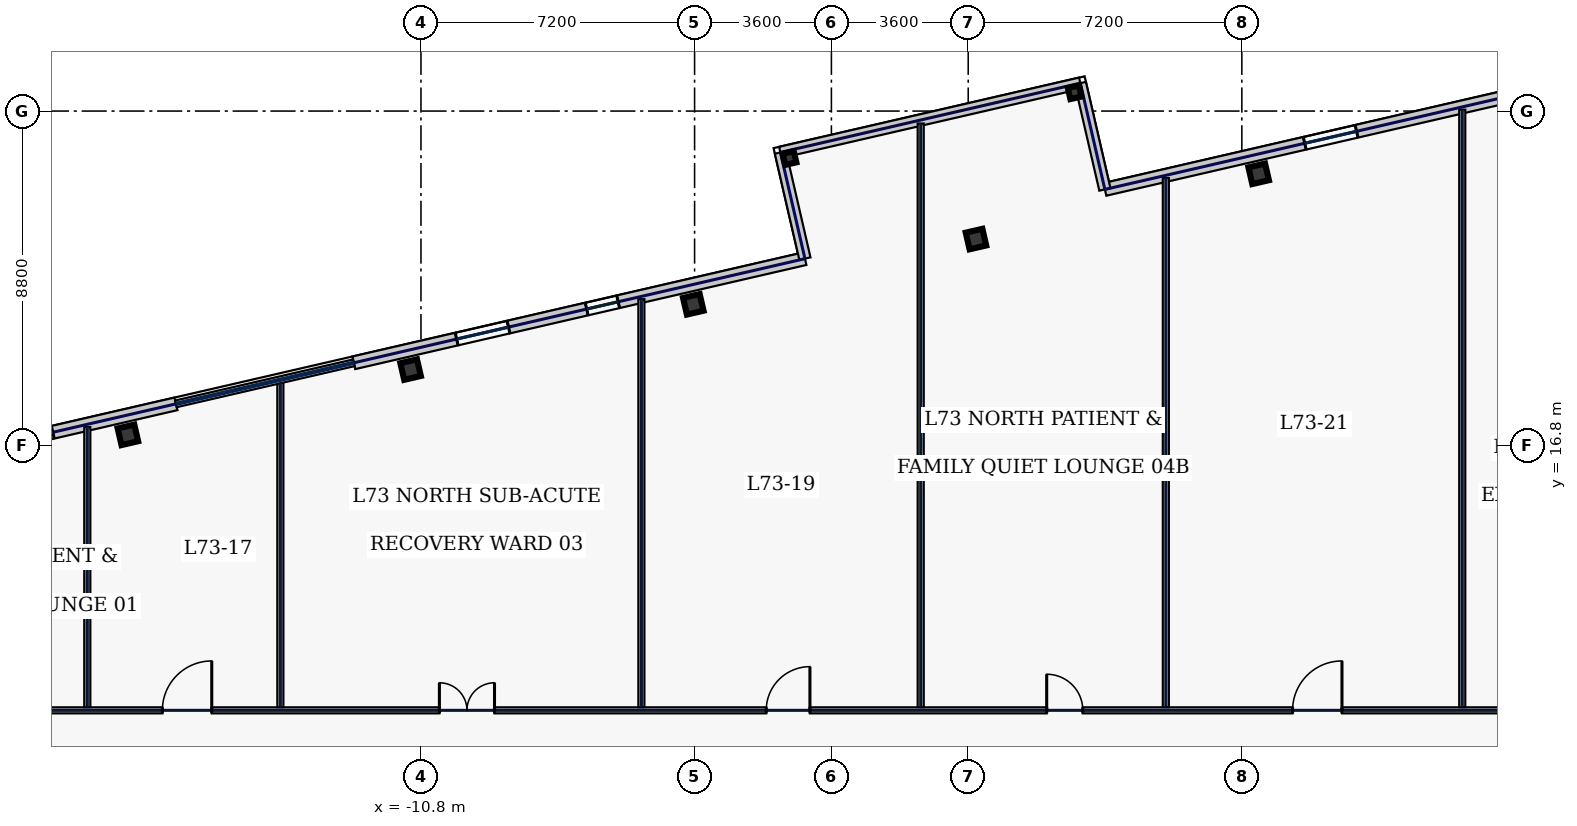
"""IFC4 building model, lengths in metres.
Left out: names, types, materials, properties, quantities, classifications, styles, units other than length and angle.
Written with IfcOpenShell. Run it as: python <this file> out.ifc"""

import sys

from ifc_helpers import new_model, si_unit, direction, frame, frame_2d, origin, origin_2d, place, context, subcontext, project, spatial, rectangle, hollow_rectangle, extrude, element, fill, save


model = new_model("IFC4")
c1 = context("Model", 3, precision=1e-05, world=origin(), true_north=direction((0.0, 1.0)))
c2 = subcontext(c1, "Body", "Model", "MODEL_VIEW")
j1 = project(units=[si_unit("LENGTHUNIT", "METRE"), si_unit("PLANEANGLEUNIT", "RADIAN")], contexts=[c1])
p1 = place(None, origin())
s1 = spatial("IfcSite", under=j1, at=p1, CompositionType="ELEMENT")
p2 = place(p1, origin())
s2 = spatial("IfcBuilding", under=s1, at=p2, CompositionType="ELEMENT")
p3 = place(p2, frame((0.0, 0.0, 313.0)))
s3 = spatial("IfcBuildingStorey", under=s2, at=p3, CompositionType="ELEMENT", Elevation=313.0)
for number, where, z_axis, x_axis in (
    (1, (11.243, 23.949, 0.0), (0.0, 0.0, 1.0), (0.974, 0.225, 0.0)),
    (2, (3.804, 22.232, 0.0), (0.0, 0.0, 1.0), (0.974, 0.225, 0.0)),
    (3, (-3.634, 20.514, 0.0), (0.0, 0.0, 1.0), (0.974, 0.225, 0.0)),
    (4, (-11.073, 18.797, 0.0), (0.0, 0.0, 1.0), (0.974, 0.225, 0.0)),
    (5, (-18.511, 17.08, 0.0), (0.0, 0.0, 1.0), (0.974, 0.225, 0.0)),
):
    element("IfcColumn", number, at=place(p3, frame(where, z_axis=z_axis, x_axis=x_axis)), inside=s3, PredefinedType="COLUMN", context=c2, shape_type="SweptSolid", body=[
        extrude(hollow_rectangle(XDim=0.45, YDim=0.45, WallThickness=0.022, at=origin_2d()), origin(), (0.0, 0.0, 1.0), 3.74),
    ])
for number, where, z_axis, x_axis in (
    (6, (-1.102, 24.363, 0.0), (0.0, 0.0, 1.0), (0.974, 0.225, 0.0)),
    (7, (6.401, 26.095, 0.0), (0.0, 0.0, 1.0), (0.974, 0.225, 0.0)),
):
    element("IfcColumn", number, at=place(p3, frame(where, z_axis=z_axis, x_axis=x_axis)), inside=s3, PredefinedType="COLUMN", context=c2, shape_type="SweptSolid", body=[
        extrude(hollow_rectangle(XDim=0.3, YDim=0.3, WallThickness=0.016, at=origin_2d()), origin(), (0.0, 0.0, 1.0), 3.74),
    ])
p4 = place(p3, frame((19.229, 26.316, 0.0), z_axis=(0.0, 0.0, 1.0), x_axis=(-0.974371201193, -0.224946131964, 0.0)))
e8 = element("IfcWall", 8, at=p4, inside=s3, PredefinedType="STANDARD", context=c2, shape_type="SweptSolid", body=[
    extrude(rectangle(XDim=12.35, YDim=0.34, at=frame_2d((6.175, 0.0))), origin(), (0.0, 0.0, 1.0), 3.74),
])
p5 = place(p4, frame((5.553, 0.0, 1.0)))
e9 = element("IfcOpeningElement", 9, at=p5, cuts=e8, PredefinedType="OPENING", context=c2, shape_type="SweptSolid", body=[
    extrude(rectangle(XDim=1.4, YDim=1.85, at=frame_2d((0.7, 0.925))), frame((0.0, 0.18, 0.0), z_axis=(0.0, -1.0, 0.0), x_axis=(1.0, 0.0, 0.0)), (0.0, 0.0, 1.0), 0.36),
])
p6 = place(p3, frame((-0.696, 21.716, 0.0), z_axis=(0.0, 0.0, 1.0), x_axis=(-0.974367550465, -0.224961944785, 0.0)))
e10 = element("IfcWall", 10, at=p6, inside=s3, PredefinedType="STANDARD", context=c2, shape_type="SweptSolid", body=[
    extrude(rectangle(XDim=12.184, YDim=0.34, at=frame_2d((6.092, 0.0))), origin(), (0.0, 0.0, 1.0), 3.74),
])
p7 = place(p6, frame((8.006, 0.0, 1.0)))
e11 = element("IfcOpeningElement", 11, at=p7, cuts=e10, PredefinedType="OPENING", context=c2, shape_type="SweptSolid", body=[
    extrude(rectangle(XDim=1.4, YDim=1.85, at=frame_2d((0.7, 0.925))), frame((0.0, 0.18, 0.0), z_axis=(0.0, -1.0, 0.0), x_axis=(1.0, 0.0, 0.0)), (0.0, 0.0, 1.0), 0.36),
])
p8 = place(p6, frame((5.044, 0.0, 1.0)))
e12 = element("IfcOpeningElement", 12, at=p8, cuts=e10, PredefinedType="OPENING", context=c2, shape_type="SweptSolid", body=[
    extrude(rectangle(XDim=0.85, YDim=1.85, at=frame_2d((0.425, 0.925))), frame((0.0, 0.18, 0.0), z_axis=(0.0, -1.0, 0.0), x_axis=(1.0, 0.0, 0.0)), (0.0, 0.0, 1.0), 0.36),
])
p9 = place(p3, frame((-17.245, 17.895, 0.0), z_axis=(0.0, 0.0, 1.0), x_axis=(-0.97437318493, -0.224937539085, 0.0)))
e13 = element("IfcWall", 13, at=p9, inside=s3, PredefinedType="STANDARD", context=c2, shape_type="SweptSolid", body=[
    extrude(rectangle(XDim=17.366, YDim=0.34, at=frame_2d((8.683, 0.0))), origin(), (0.0, 0.0, 1.0), 3.74),
])
p10 = place(p9, frame((13.925, 0.0, 1.0)))
e14 = element("IfcOpeningElement", 14, at=p10, cuts=e13, PredefinedType="OPENING", context=c2, shape_type="SweptSolid", body=[
    extrude(rectangle(XDim=1.4, YDim=1.85, at=frame_2d((0.7, 0.925))), frame((0.0, 0.18, 0.0), z_axis=(0.0, -1.0, 0.0), x_axis=(1.0, 0.0, 0.0)), (0.0, 0.0, 1.0), 0.36),
])
p11 = place(p9, frame((10.413, 0.0, 1.0)))
e15 = element("IfcOpeningElement", 15, at=p11, cuts=e13, PredefinedType="OPENING", context=c2, shape_type="SweptSolid", body=[
    extrude(rectangle(XDim=1.4, YDim=1.85, at=frame_2d((0.7, 0.925))), frame((0.0, 0.18, 0.0), z_axis=(0.0, -1.0, 0.0), x_axis=(1.0, 0.0, 0.0)), (0.0, 0.0, 1.0), 0.36),
])
p12 = place(p9, frame((3.329, 0.0, 1.0)))
e16 = element("IfcOpeningElement", 16, at=p12, cuts=e13, PredefinedType="OPENING", context=c2, shape_type="SweptSolid", body=[
    extrude(rectangle(XDim=0.85, YDim=1.85, at=frame_2d((0.425, 0.925))), frame((0.0, 0.18, 0.0), z_axis=(0.0, -1.0, 0.0), x_axis=(1.0, 0.0, 0.0)), (0.0, 0.0, 1.0), 0.36),
])
for number, where, z_axis, x_axis in (
    (17, (-0.696, 21.716, 0.0), (0.0, 0.0, 1.0), (-0.225, 0.974, 0.0)),
    (18, (7.196, 23.538, 0.0), (0.0, 0.0, 1.0), (-0.225, 0.974, 0.0)),
):
    element("IfcWall", number, at=place(p3, frame(where, z_axis=z_axis, x_axis=x_axis)), inside=s3, PredefinedType="STANDARD", context=c2, shape_type="SweptSolid", body=[
        extrude(rectangle(XDim=2.87, YDim=0.3, at=frame_2d((1.435, 0.0))), origin(), (0.0, 0.0, 1.0), 3.74),
    ])
p13 = place(p3, frame((-1.342, 24.512, 0.0), z_axis=(0.0, 0.0, 1.0), x_axis=(0.974371888243, 0.224943155936, 0.0)))
e19 = element("IfcWall", 19, at=p13, inside=s3, PredefinedType="STANDARD", context=c2, shape_type="SweptSolid", body=[
    extrude(rectangle(XDim=8.1, YDim=0.3, at=frame_2d((4.05, 0.0))), origin(), (0.0, 0.0, 1.0), 2.135),
])
p14 = place(p3, frame((-24.145, 9.83, 0.0), z_axis=(0.0, 0.0, 1.0), x_axis=(1.0, 0.0, 0.0)))
e20 = element("IfcWall", 20, at=p14, inside=s3, PredefinedType="PARTITIONING", context=c2, shape_type="SweptSolid", body=[
    extrude(rectangle(XDim=48.29, YDim=0.16, at=frame_2d((24.145, 0.0))), origin(), (0.0, 0.0, 1.0), 3.74),
])
p15 = place(p14, frame((2.044, 0.0, 0.0)))
e21 = element("IfcOpeningElement", 21, at=p15, cuts=e20, PredefinedType="OPENING", context=c2, shape_type="SweptSolid", body=[
    extrude(rectangle(XDim=0.95, YDim=2.2, at=frame_2d((0.475, 1.1))), frame((0.0, 0.09, 0.0), z_axis=(0.0, -1.0, 0.0), x_axis=(1.0, 0.0, 0.0)), (0.0, 0.0, 1.0), 0.18),
])
p16 = place(p14, frame((6.54, 0.0, 0.0)))
e22 = element("IfcOpeningElement", 22, at=p16, cuts=e20, PredefinedType="OPENING", context=c2, shape_type="SweptSolid", body=[
    extrude(rectangle(XDim=1.3, YDim=2.2, at=frame_2d((0.65, 1.1))), frame((0.0, 0.09, 0.0), z_axis=(0.0, -1.0, 0.0), x_axis=(1.0, 0.0, 0.0)), (0.0, 0.0, 1.0), 0.18),
])
p17 = place(p14, frame((13.83, 0.0, 0.0)))
e23 = element("IfcOpeningElement", 23, at=p17, cuts=e20, PredefinedType="OPENING", context=c2, shape_type="SweptSolid", body=[
    extrude(rectangle(XDim=1.45, YDim=2.2, at=frame_2d((0.725, 1.1))), frame((0.0, 0.09, 0.0), z_axis=(0.0, -1.0, 0.0), x_axis=(1.0, 0.0, 0.0)), (0.0, 0.0, 1.0), 0.18),
])
p18 = place(p14, frame((22.43, 0.0, 0.0)))
e24 = element("IfcOpeningElement", 24, at=p18, cuts=e20, PredefinedType="OPENING", context=c2, shape_type="SweptSolid", body=[
    extrude(rectangle(XDim=1.15, YDim=2.2, at=frame_2d((0.575, 1.1))), frame((0.0, 0.09, 0.0), z_axis=(0.0, -1.0, 0.0), x_axis=(1.0, 0.0, 0.0)), (0.0, 0.0, 1.0), 0.18),
])
p19 = place(p14, frame((29.81, 0.0, 0.0)))
e25 = element("IfcOpeningElement", 25, at=p19, cuts=e20, PredefinedType="OPENING", context=c2, shape_type="SweptSolid", body=[
    extrude(rectangle(XDim=0.95, YDim=2.2, at=frame_2d((0.475, 1.1))), frame((0.0, 0.09, 0.0), z_axis=(0.0, -1.0, 0.0), x_axis=(1.0, 0.0, 0.0)), (0.0, 0.0, 1.0), 0.18),
])
p20 = place(p14, frame((36.28, 0.0, 0.0)))
e26 = element("IfcOpeningElement", 26, at=p20, cuts=e20, PredefinedType="OPENING", context=c2, shape_type="SweptSolid", body=[
    extrude(rectangle(XDim=1.3, YDim=2.2, at=frame_2d((0.65, 1.1))), frame((0.0, 0.09, 0.0), z_axis=(0.0, -1.0, 0.0), x_axis=(1.0, 0.0, 0.0)), (0.0, 0.0, 1.0), 0.18),
])
p21 = place(p14, frame((43.976, 0.0, 0.0)))
e27 = element("IfcOpeningElement", 27, at=p21, cuts=e20, PredefinedType="OPENING", context=c2, shape_type="SweptSolid", body=[
    extrude(rectangle(XDim=0.95, YDim=2.2, at=frame_2d((0.475, 1.1))), frame((0.0, 0.09, 0.0), z_axis=(0.0, -1.0, 0.0), x_axis=(1.0, 0.0, 0.0)), (0.0, 0.0, 1.0), 0.18),
])
p22 = place(p3, frame((-19.58, 9.915, 0.0), z_axis=(0.0, 0.0, 1.0), x_axis=(0.0, 1.0, 0.0)))
e28 = element("IfcWall", 28, at=p22, inside=s3, PredefinedType="PARTITIONING", context=c2, shape_type="SweptSolid", body=[
    extrude(rectangle(XDim=7.369, YDim=0.16, at=frame_2d((3.685, 0.0))), origin(), (0.0, 0.0, 1.0), 3.74),
])
p23 = place(p3, frame((-14.5, 9.915, 0.0), z_axis=(0.0, 0.0, 1.0), x_axis=(0.0, 1.0, 0.0)))
e29 = element("IfcWall", 29, at=p23, inside=s3, PredefinedType="PARTITIONING", context=c2, shape_type="SweptSolid", body=[
    extrude(rectangle(XDim=8.542, YDim=0.16, at=frame_2d((4.271, 0.0))), origin(), (0.0, 0.0, 1.0), 3.74),
])
p24 = place(p3, frame((-5.0, 9.915, 0.0), z_axis=(0.0, 0.0, 1.0), x_axis=(0.0, 1.0, 0.0)))
e30 = element("IfcWall", 30, at=p24, inside=s3, PredefinedType="PARTITIONING", context=c2, shape_type="SweptSolid", body=[
    extrude(rectangle(XDim=10.735, YDim=0.16, at=frame_2d((5.368, 0.0))), origin(), (0.0, 0.0, 1.0), 3.74),
])
p25 = place(p3, frame((8.8, 9.915, 0.0), z_axis=(0.0, 0.0, 1.0), x_axis=(0.0, 1.0, 0.0)))
e31 = element("IfcWall", 31, at=p25, inside=s3, PredefinedType="PARTITIONING", context=c2, shape_type="SweptSolid", body=[
    extrude(rectangle(XDim=13.921, YDim=0.16, at=frame_2d((6.961, 0.0))), origin(), (0.0, 0.0, 1.0), 3.74),
])
p26 = place(p3, frame((16.6, 9.915, 0.0), z_axis=(0.0, 0.0, 1.0), x_axis=(0.0, 1.0, 0.0)))
e32 = element("IfcWall", 32, at=p26, inside=s3, PredefinedType="PARTITIONING", context=c2, shape_type="SweptSolid", body=[
    extrude(rectangle(XDim=15.722, YDim=0.16, at=frame_2d((7.861, 0.0))), origin(), (0.0, 0.0, 1.0), 3.74),
])
p27 = place(p3, frame((2.35, 9.915, 0.0), z_axis=(0.0, 0.0, 1.0), x_axis=(0.0, 1.0, 0.0)))
e33 = element("IfcWall", 33, at=p27, inside=s3, PredefinedType="PARTITIONING", context=c2, shape_type="SweptSolid", body=[
    extrude(rectangle(XDim=15.357, YDim=0.16, at=frame_2d((7.679, 0.0))), origin(), (0.0, 0.0, 1.0), 3.74),
])
p28 = place(p5, origin())
e34 = element("IfcWindow", 34, at=p28, inside=s3, PartitioningType="SINGLE_PANEL", PredefinedType="WINDOW", context=c2, shape_type="SweptSolid", body=[
    extrude(rectangle(XDim=1.4, YDim=1.85, at=frame_2d((0.7, 0.925))), frame((0.0, 0.03, 0.0), z_axis=(0.0, -1.0, 0.0), x_axis=(1.0, 0.0, 0.0)), (0.0, 0.0, 1.0), 0.06),
])
fill(e9, e34)
p29 = place(p7, origin())
e35 = element("IfcWindow", 35, at=p29, inside=s3, PartitioningType="SINGLE_PANEL", PredefinedType="WINDOW", context=c2, shape_type="SweptSolid", body=[
    extrude(rectangle(XDim=1.4, YDim=1.85, at=frame_2d((0.7, 0.925))), frame((0.0, 0.03, 0.0), z_axis=(0.0, -1.0, 0.0), x_axis=(1.0, 0.0, 0.0)), (0.0, 0.0, 1.0), 0.06),
])
fill(e11, e35)
p30 = place(p8, origin())
e36 = element("IfcWindow", 36, at=p30, inside=s3, PartitioningType="SINGLE_PANEL", PredefinedType="WINDOW", context=c2, shape_type="SweptSolid", body=[
    extrude(rectangle(XDim=0.85, YDim=1.85, at=frame_2d((0.425, 0.925))), frame((0.0, 0.03, 0.0), z_axis=(0.0, -1.0, 0.0), x_axis=(1.0, 0.0, 0.0)), (0.0, 0.0, 1.0), 0.06),
])
fill(e12, e36)
p31 = place(p12, origin())
e37 = element("IfcWindow", 37, at=p31, inside=s3, PartitioningType="SINGLE_PANEL", PredefinedType="WINDOW", context=c2, shape_type="SweptSolid", body=[
    extrude(rectangle(XDim=0.85, YDim=1.85, at=frame_2d((0.425, 0.925))), frame((0.0, 0.03, 0.0), z_axis=(0.0, -1.0, 0.0), x_axis=(1.0, 0.0, 0.0)), (0.0, 0.0, 1.0), 0.06),
])
fill(e16, e37)
p32 = place(p16, origin())
e38 = element("IfcDoor", 38, at=p32, inside=s3, OperationType="SINGLE_SWING_RIGHT", PredefinedType="DOOR", context=c2, shape_type="SweptSolid", body=[
    extrude(rectangle(XDim=1.3, YDim=2.2, at=frame_2d((0.65, 1.1))), frame((0.0, 0.025, 0.0), z_axis=(0.0, -1.0, 0.0), x_axis=(1.0, 0.0, 0.0)), (0.0, 0.0, 1.0), 0.05),
])
fill(e22, e38)
p33 = place(p17, origin())
e39 = element("IfcDoor", 39, at=p33, inside=s3, OperationType="DOUBLE_SWING_LEFT", PredefinedType="DOOR", context=c2, shape_type="SweptSolid", body=[
    extrude(rectangle(XDim=1.45, YDim=2.2, at=frame_2d((0.725, 1.1))), frame((0.0, 0.025, 0.0), z_axis=(0.0, -1.0, 0.0), x_axis=(1.0, 0.0, 0.0)), (0.0, 0.0, 1.0), 0.05),
])
fill(e23, e39)
p34 = place(p18, origin())
e40 = element("IfcDoor", 40, at=p34, inside=s3, OperationType="SINGLE_SWING_RIGHT", PredefinedType="DOOR", context=c2, shape_type="SweptSolid", body=[
    extrude(rectangle(XDim=1.15, YDim=2.2, at=frame_2d((0.575, 1.1))), frame((0.0, 0.025, 0.0), z_axis=(0.0, -1.0, 0.0), x_axis=(1.0, 0.0, 0.0)), (0.0, 0.0, 1.0), 0.05),
])
fill(e24, e40)
p35 = place(p19, origin())
e41 = element("IfcDoor", 41, at=p35, inside=s3, OperationType="SINGLE_SWING_LEFT", PredefinedType="DOOR", context=c2, shape_type="SweptSolid", body=[
    extrude(rectangle(XDim=0.95, YDim=2.2, at=frame_2d((0.475, 1.1))), frame((0.0, 0.025, 0.0), z_axis=(0.0, -1.0, 0.0), x_axis=(1.0, 0.0, 0.0)), (0.0, 0.0, 1.0), 0.05),
])
fill(e25, e41)
p36 = place(p20, origin())
e42 = element("IfcDoor", 42, at=p36, inside=s3, OperationType="SINGLE_SWING_RIGHT", PredefinedType="DOOR", context=c2, shape_type="SweptSolid", body=[
    extrude(rectangle(XDim=1.3, YDim=2.2, at=frame_2d((0.65, 1.1))), frame((0.0, 0.025, 0.0), z_axis=(0.0, -1.0, 0.0), x_axis=(1.0, 0.0, 0.0)), (0.0, 0.0, 1.0), 0.05),
])
fill(e26, e42)
save(model, sys.argv[1])
